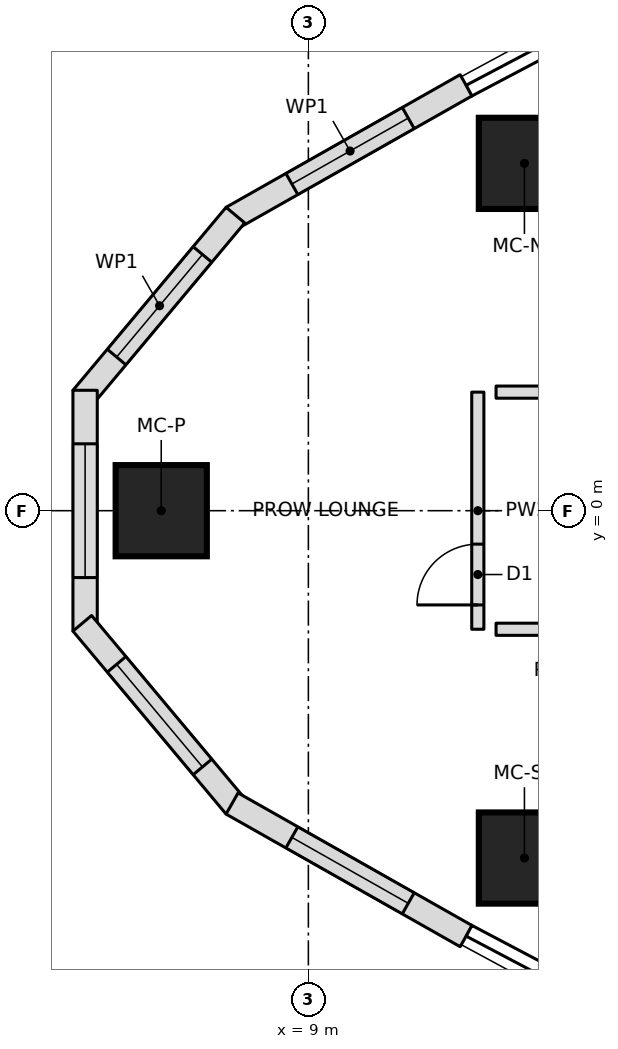
"""IFC4 building model, lengths in metres.
Left out: names, types, materials, properties, quantities, classifications, styles, units other than length and angle.
Written with IfcOpenShell. Run it as: python <this file> out.ifc"""

import sys

from ifc_helpers import new_model, si_unit, direction, frame, frame_2d, origin, origin_2d, place, context, subcontext, project, spatial, polyline, rectangle, outline, extrude, element, fill, save


model = new_model("IFC4")
c1 = context("Model", 3, precision=1e-05, world=origin(), true_north=direction((0.0, 1.0)))
c2 = subcontext(c1, "Body", "Model", "MODEL_VIEW")
j1 = project(units=[si_unit("LENGTHUNIT", "METRE"), si_unit("PLANEANGLEUNIT", "RADIAN")], contexts=[c1])
p1 = place(None, origin())
s1 = spatial("IfcSite", under=j1, at=p1, CompositionType="ELEMENT")
p2 = place(p1, origin())
s2 = spatial("IfcBuilding", under=s1, at=p2, CompositionType="ELEMENT")
p3 = place(p2, frame((0.0, 0.0, 162.15)))
s3 = spatial("IfcBuildingStorey", under=s2, at=p3, CompositionType="ELEMENT", Elevation=162.15)
for number, where, z_axis, x_axis in (
    (1, (6.58, 0.0, 0.0), (0.0, 0.0, 1.0), (1.0, 0.0, 0.0)),
    (2, (12.553, -5.713, 0.0), (0.0, 0.0, 1.0), (1.0, 0.0, 0.0)),
    (3, (12.553, 5.713, 0.0), (0.0, 0.0, 1.0), (1.0, 0.0, 0.0)),
):
    element("IfcColumn", number, at=place(p3, frame(where, z_axis=z_axis, x_axis=x_axis)), inside=s3, PredefinedType="COLUMN", context=c2, shape_type="SweptSolid", body=[
        extrude(rectangle(XDim=1.5, YDim=1.5, at=origin_2d()), origin(), (0.0, 0.0, 1.0), 3.55),
    ])
p4 = place(p3, frame((11.594, 6.997, 0.0), z_axis=(0.0, 0.0, 1.0), x_axis=(-0.870045255208, -0.492971859125, 0.0)))
e4 = element("IfcWall", 4, at=p4, inside=s3, PredefinedType="NOTDEFINED", context=c2, shape_type="SweptSolid", body=[
    extrude(outline(polyline([(0.0, -0.2), (4.424, -0.2), (4.352, 0.2), (0.0, 0.2), (0.0, -0.2)])), origin(), (0.0, 0.0, 1.0), 3.25),
])
p5 = place(p4, frame((1.094, 0.0, 0.6)))
e5 = element("IfcOpeningElement", 5, at=p5, cuts=e4, PredefinedType="OPENING", context=c2, shape_type="SweptSolid", body=[
    extrude(outline(polyline([(0.0, 1.35), (0.084, 1.771), (0.322, 2.128), (0.679, 2.366), (1.1, 2.45), (1.521, 2.366), (1.878, 2.128), (2.116, 1.771), (2.2, 1.35), (2.2, 1.1), (2.116, 0.679), (1.878, 0.322), (1.521, 0.084), (1.1, 0.0), (0.679, 0.084), (0.322, 0.322), (0.084, 0.679), (0.0, 1.1), (0.0, 1.35)])), frame((0.0, 0.21, 0.0), z_axis=(0.0, -1.0, 0.0), x_axis=(1.0, 0.0, 0.0)), (0.0, 0.0, 1.0), 0.42),
])
p6 = place(p3, frame((7.777, 4.834, 0.0), z_axis=(0.0, 0.0, 1.0), x_axis=(-0.641787918235, -0.766882173484, 0.0)))
e6 = element("IfcWall", 6, at=p6, inside=s3, PredefinedType="NOTDEFINED", context=c2, shape_type="SweptSolid", body=[
    extrude(outline(polyline([(-0.036, -0.2), (3.888, -0.2), (3.743, 0.2), (0.036, 0.2), (-0.036, -0.2)])), origin(), (0.0, 0.0, 1.0), 3.25),
])
p7 = place(p6, frame((0.808, 0.0, 0.6)))
e7 = element("IfcOpeningElement", 7, at=p7, cuts=e6, PredefinedType="OPENING", context=c2, shape_type="SweptSolid", body=[
    extrude(outline(polyline([(0.0, 1.35), (0.084, 1.771), (0.322, 2.128), (0.679, 2.366), (1.1, 2.45), (1.521, 2.366), (1.878, 2.128), (2.116, 1.771), (2.2, 1.35), (2.2, 1.1), (2.116, 0.679), (1.878, 0.322), (1.521, 0.084), (1.1, 0.0), (0.679, 0.084), (0.322, 0.322), (0.084, 0.679), (0.0, 1.1), (0.0, 1.35)])), frame((0.0, 0.21, 0.0), z_axis=(0.0, -1.0, 0.0), x_axis=(1.0, 0.0, 0.0)), (0.0, 0.0, 1.0), 0.42),
])
p8 = place(p3, frame((5.328, 1.908, 0.0), z_axis=(0.0, 0.0, 1.0), x_axis=(0.0, -1.0, 0.0)))
e8 = element("IfcWall", 8, at=p8, inside=s3, PredefinedType="NOTDEFINED", context=c2, shape_type="SweptSolid", body=[
    extrude(outline(polyline([(-0.073, -0.2), (3.888, -0.2), (3.743, 0.2), (0.073, 0.2), (-0.073, -0.2)])), origin(), (0.0, 0.0, 1.0), 3.25),
])
p9 = place(p8, frame((0.808, 0.0, 0.6)))
e9 = element("IfcOpeningElement", 9, at=p9, cuts=e8, PredefinedType="OPENING", context=c2, shape_type="SweptSolid", body=[
    extrude(outline(polyline([(0.0, 1.35), (0.084, 1.771), (0.322, 2.128), (0.679, 2.366), (1.1, 2.45), (1.521, 2.366), (1.878, 2.128), (2.116, 1.771), (2.2, 1.35), (2.2, 1.1), (2.116, 0.679), (1.878, 0.322), (1.521, 0.084), (1.1, 0.0), (0.679, 0.084), (0.322, 0.322), (0.084, 0.679), (0.0, 1.1), (0.0, 1.35)])), frame((0.0, 0.21, 0.0), z_axis=(0.0, -1.0, 0.0), x_axis=(1.0, 0.0, 0.0)), (0.0, 0.0, 1.0), 0.42),
])
p10 = place(p3, frame((5.328, -1.908, 0.0), z_axis=(0.0, 0.0, 1.0), x_axis=(0.641787918235, -0.766882173484, 0.0)))
e10 = element("IfcWall", 10, at=p10, inside=s3, PredefinedType="NOTDEFINED", context=c2, shape_type="SweptSolid", body=[
    extrude(outline(polyline([(-0.073, -0.2), (3.852, -0.2), (3.779, 0.2), (0.073, 0.2), (-0.073, -0.2)])), origin(), (0.0, 0.0, 1.0), 3.25),
])
p11 = place(p10, frame((0.808, 0.0, 0.6)))
e11 = element("IfcOpeningElement", 11, at=p11, cuts=e10, PredefinedType="OPENING", context=c2, shape_type="SweptSolid", body=[
    extrude(outline(polyline([(0.0, 1.35), (0.084, 1.771), (0.322, 2.128), (0.679, 2.366), (1.1, 2.45), (1.521, 2.366), (1.878, 2.128), (2.116, 1.771), (2.2, 1.35), (2.2, 1.1), (2.116, 0.679), (1.878, 0.322), (1.521, 0.084), (1.1, 0.0), (0.679, 0.084), (0.322, 0.322), (0.084, 0.679), (0.0, 1.1), (0.0, 1.35)])), frame((0.0, 0.21, 0.0), z_axis=(0.0, -1.0, 0.0), x_axis=(1.0, 0.0, 0.0)), (0.0, 0.0, 1.0), 0.42),
])
p12 = place(p3, frame((7.777, -4.834, 0.0), z_axis=(0.0, 0.0, 1.0), x_axis=(0.870045255208, -0.492971859125, 0.0)))
e12 = element("IfcWall", 12, at=p12, inside=s3, PredefinedType="NOTDEFINED", context=c2, shape_type="SweptSolid", body=[
    extrude(outline(polyline([(-0.036, -0.2), (4.388, -0.2), (4.388, 0.2), (0.036, 0.2), (-0.036, -0.2)])), origin(), (0.0, 0.0, 1.0), 3.25),
])
p13 = place(p12, frame((1.094, 0.0, 0.6)))
e13 = element("IfcOpeningElement", 13, at=p13, cuts=e12, PredefinedType="OPENING", context=c2, shape_type="SweptSolid", body=[
    extrude(outline(polyline([(0.0, 1.35), (0.084, 1.771), (0.322, 2.128), (0.679, 2.366), (1.1, 2.45), (1.521, 2.366), (1.878, 2.128), (2.116, 1.771), (2.2, 1.35), (2.2, 1.1), (2.116, 0.679), (1.878, 0.322), (1.521, 0.084), (1.1, 0.0), (0.679, 0.084), (0.322, 0.322), (0.084, 0.679), (0.0, 1.1), (0.0, 1.35)])), frame((0.0, 0.21, 0.0), z_axis=(0.0, -1.0, 0.0), x_axis=(1.0, 0.0, 0.0)), (0.0, 0.0, 1.0), 0.42),
])
p14 = place(p3, frame((12.087, 1.95, 0.0), z_axis=(0.0, 0.0, 1.0), x_axis=(1.0, 0.0, 0.0)))
e14 = element("IfcWall", 14, at=p14, inside=s3, PredefinedType="PARTITIONING", context=c2, shape_type="SweptSolid", body=[
    extrude(rectangle(XDim=3.372, YDim=0.2, at=frame_2d((1.686, 0.0))), origin(), (0.0, 0.0, 1.0), 3.15),
])
p15 = place(p14, frame((1.186, 0.0, 0.0)))
e15 = element("IfcOpeningElement", 15, at=p15, cuts=e14, PredefinedType="OPENING", context=c2, shape_type="SweptSolid", body=[
    extrude(rectangle(XDim=1.0, YDim=2.1, at=frame_2d((0.5, 1.05))), frame((0.0, 0.11, 0.0), z_axis=(0.0, -1.0, 0.0), x_axis=(1.0, 0.0, 0.0)), (0.0, 0.0, 1.0), 0.22),
])
p16 = place(p3, frame((12.087, -1.95, 0.0), z_axis=(0.0, 0.0, 1.0), x_axis=(1.0, 0.0, 0.0)))
e16 = element("IfcWall", 16, at=p16, inside=s3, PredefinedType="PARTITIONING", context=c2, shape_type="SweptSolid", body=[
    extrude(rectangle(XDim=3.372, YDim=0.2, at=frame_2d((1.686, 0.0))), origin(), (0.0, 0.0, 1.0), 3.15),
])
p17 = place(p16, frame((1.186, 0.0, 0.0)))
e17 = element("IfcOpeningElement", 17, at=p17, cuts=e16, PredefinedType="OPENING", context=c2, shape_type="SweptSolid", body=[
    extrude(rectangle(XDim=1.0, YDim=2.1, at=frame_2d((0.5, 1.05))), frame((0.0, 0.11, 0.0), z_axis=(0.0, -1.0, 0.0), x_axis=(1.0, 0.0, 0.0)), (0.0, 0.0, 1.0), 0.22),
])
p18 = place(p3, frame((11.787, -1.95, 0.0), z_axis=(0.0, 0.0, 1.0), x_axis=(0.0, 1.0, 0.0)))
e18 = element("IfcWall", 18, at=p18, inside=s3, PredefinedType="PARTITIONING", context=c2, shape_type="SweptSolid", body=[
    extrude(rectangle(XDim=3.9, YDim=0.2, at=frame_2d((1.95, 0.0))), origin(), (0.0, 0.0, 1.0), 3.15),
])
p19 = place(p18, frame((0.4, 0.0, 0.0)))
e19 = element("IfcOpeningElement", 19, at=p19, cuts=e18, PredefinedType="OPENING", context=c2, shape_type="SweptSolid", body=[
    extrude(rectangle(XDim=1.0, YDim=2.1, at=frame_2d((0.5, 1.05))), frame((0.0, 0.11, 0.0), z_axis=(0.0, -1.0, 0.0), x_axis=(1.0, 0.0, 0.0)), (0.0, 0.0, 1.0), 0.22),
])
p20 = place(p5, origin())
e20 = element("IfcWindow", 20, at=p20, inside=s3, PartitioningType="SINGLE_PANEL", PredefinedType="WINDOW", context=c2, shape_type="SweptSolid", body=[
    extrude(outline(polyline([(0.0, 1.35), (0.084, 1.771), (0.322, 2.128), (0.679, 2.366), (1.1, 2.45), (1.521, 2.366), (1.878, 2.128), (2.116, 1.771), (2.2, 1.35), (2.2, 1.1), (2.116, 0.679), (1.878, 0.322), (1.521, 0.084), (1.1, 0.0), (0.679, 0.084), (0.322, 0.322), (0.084, 0.679), (0.0, 1.1), (0.0, 1.35)])), frame((0.0, 0.17, 0.0), z_axis=(0.0, -1.0, 0.0), x_axis=(1.0, 0.0, 0.0)), (0.0, 0.0, 1.0), 0.06),
])
fill(e5, e20)
p21 = place(p7, origin())
e21 = element("IfcWindow", 21, at=p21, inside=s3, PartitioningType="SINGLE_PANEL", PredefinedType="WINDOW", context=c2, shape_type="SweptSolid", body=[
    extrude(outline(polyline([(0.0, 1.35), (0.084, 1.771), (0.322, 2.128), (0.679, 2.366), (1.1, 2.45), (1.521, 2.366), (1.878, 2.128), (2.116, 1.771), (2.2, 1.35), (2.2, 1.1), (2.116, 0.679), (1.878, 0.322), (1.521, 0.084), (1.1, 0.0), (0.679, 0.084), (0.322, 0.322), (0.084, 0.679), (0.0, 1.1), (0.0, 1.35)])), frame((0.0, 0.17, 0.0), z_axis=(0.0, -1.0, 0.0), x_axis=(1.0, 0.0, 0.0)), (0.0, 0.0, 1.0), 0.06),
])
fill(e7, e21)
p22 = place(p9, origin())
e22 = element("IfcWindow", 22, at=p22, inside=s3, PartitioningType="SINGLE_PANEL", PredefinedType="WINDOW", context=c2, shape_type="SweptSolid", body=[
    extrude(outline(polyline([(0.0, 1.35), (0.084, 1.771), (0.322, 2.128), (0.679, 2.366), (1.1, 2.45), (1.521, 2.366), (1.878, 2.128), (2.116, 1.771), (2.2, 1.35), (2.2, 1.1), (2.116, 0.679), (1.878, 0.322), (1.521, 0.084), (1.1, 0.0), (0.679, 0.084), (0.322, 0.322), (0.084, 0.679), (0.0, 1.1), (0.0, 1.35)])), frame((0.0, 0.17, 0.0), z_axis=(0.0, -1.0, 0.0), x_axis=(1.0, 0.0, 0.0)), (0.0, 0.0, 1.0), 0.06),
])
fill(e9, e22)
p23 = place(p11, origin())
e23 = element("IfcWindow", 23, at=p23, inside=s3, PartitioningType="SINGLE_PANEL", PredefinedType="WINDOW", context=c2, shape_type="SweptSolid", body=[
    extrude(outline(polyline([(0.0, 1.35), (0.084, 1.771), (0.322, 2.128), (0.679, 2.366), (1.1, 2.45), (1.521, 2.366), (1.878, 2.128), (2.116, 1.771), (2.2, 1.35), (2.2, 1.1), (2.116, 0.679), (1.878, 0.322), (1.521, 0.084), (1.1, 0.0), (0.679, 0.084), (0.322, 0.322), (0.084, 0.679), (0.0, 1.1), (0.0, 1.35)])), frame((0.0, 0.17, 0.0), z_axis=(0.0, -1.0, 0.0), x_axis=(1.0, 0.0, 0.0)), (0.0, 0.0, 1.0), 0.06),
])
fill(e11, e23)
p24 = place(p13, origin())
e24 = element("IfcWindow", 24, at=p24, inside=s3, PartitioningType="SINGLE_PANEL", PredefinedType="WINDOW", context=c2, shape_type="SweptSolid", body=[
    extrude(outline(polyline([(0.0, 1.35), (0.084, 1.771), (0.322, 2.128), (0.679, 2.366), (1.1, 2.45), (1.521, 2.366), (1.878, 2.128), (2.116, 1.771), (2.2, 1.35), (2.2, 1.1), (2.116, 0.679), (1.878, 0.322), (1.521, 0.084), (1.1, 0.0), (0.679, 0.084), (0.322, 0.322), (0.084, 0.679), (0.0, 1.1), (0.0, 1.35)])), frame((0.0, 0.17, 0.0), z_axis=(0.0, -1.0, 0.0), x_axis=(1.0, 0.0, 0.0)), (0.0, 0.0, 1.0), 0.06),
])
fill(e13, e24)
p25 = place(p19, origin())
e25 = element("IfcDoor", 25, at=p25, inside=s3, OperationType="SINGLE_SWING_LEFT", PredefinedType="DOOR", context=c2, shape_type="SweptSolid", body=[
    extrude(rectangle(XDim=1.0, YDim=2.1, at=frame_2d((0.5, 1.05))), frame((0.0, 0.025, 0.0), z_axis=(0.0, -1.0, 0.0), x_axis=(1.0, 0.0, 0.0)), (0.0, 0.0, 1.0), 0.05),
])
fill(e19, e25)
save(model, sys.argv[1])
